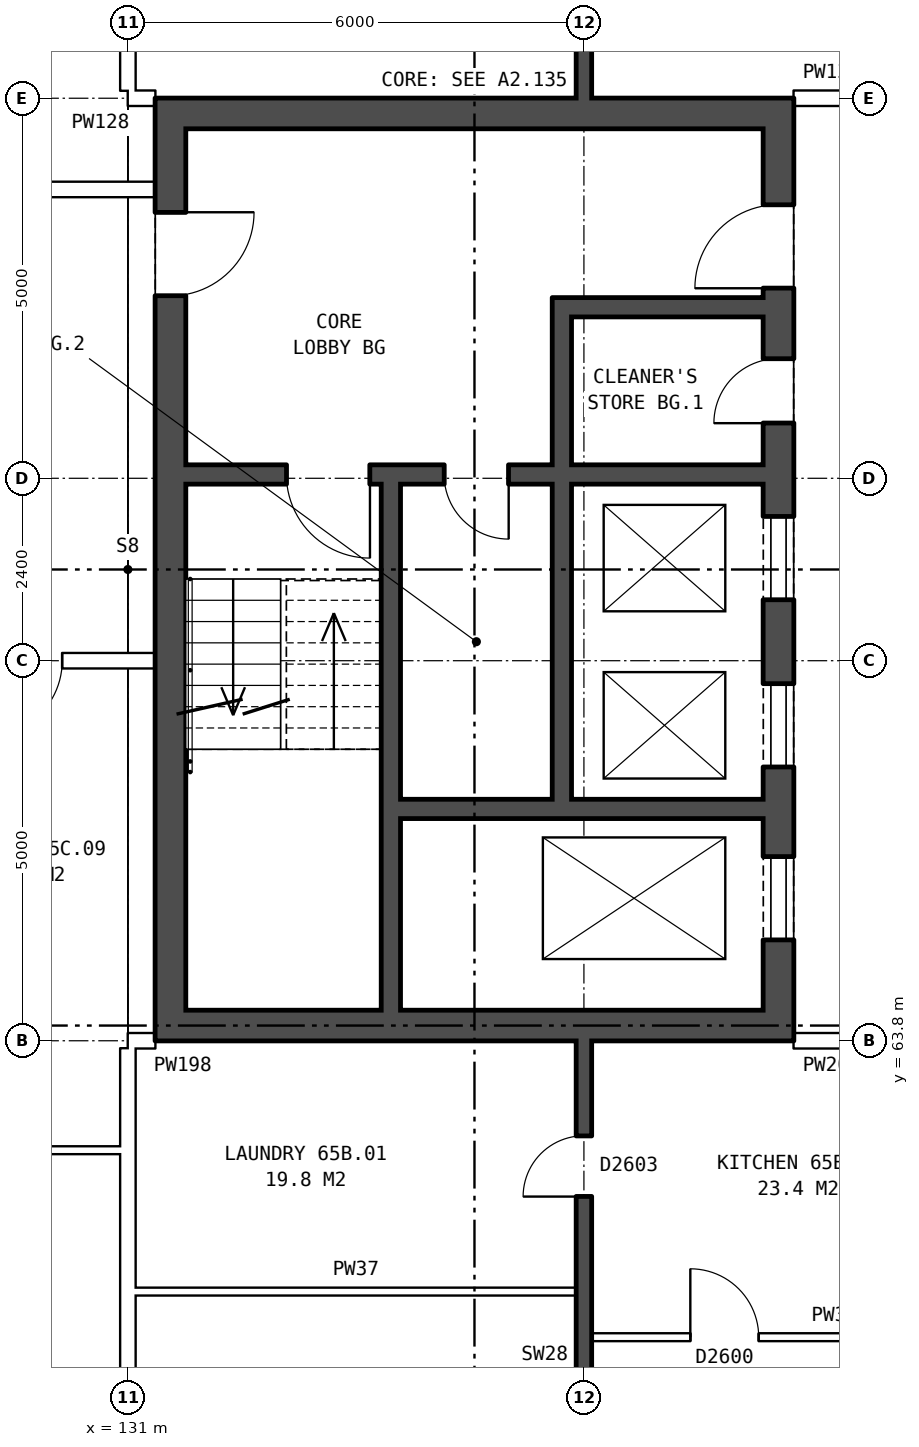
"""IFC4 building model, lengths in metres.
Left out: names, types, materials, properties, quantities, classifications, styles, units other than length and angle.
Written with IfcOpenShell. Run it as: python <this file> out.ifc"""

import sys

from ifc_helpers import new_model, si_unit, direction, frame, frame_2d, origin, place, context, subcontext, project, spatial, rectangle, extrude, element, fill, save


model = new_model("IFC4")
c1 = context("Model", 3, precision=1e-05, world=origin(), true_north=direction((0.0, 1.0)))
c2 = subcontext(c1, "Body", "Model", "MODEL_VIEW")
j1 = project(units=[si_unit("LENGTHUNIT", "METRE"), si_unit("PLANEANGLEUNIT", "RADIAN")], contexts=[c1])
p1 = place(None, origin())
s1 = spatial("IfcSite", under=j1, at=p1, CompositionType="ELEMENT")
p2 = place(p1, origin())
s2 = spatial("IfcBuilding", under=s1, at=p2, CompositionType="ELEMENT")
p3 = place(p2, frame((0.0, 0.0, 230.7)))
s3 = spatial("IfcBuildingStorey", under=s2, at=p3, CompositionType="ELEMENT", Elevation=230.7)
p4 = place(p3, frame((139.56, 63.8, 0.0), z_axis=(0.0, 0.0, 1.0), x_axis=(0.0, 1.0, 0.0)))
e1 = element("IfcWall", 1, at=p4, inside=s3, PredefinedType="SHEAR", context=c2, shape_type="SweptSolid", body=[
    extrude(rectangle(XDim=12.4, YDim=0.4, at=frame_2d((6.2, 0.0))), origin(), (0.0, 0.0, 1.0), 2.85),
])
p5 = place(p4, frame((1.325, 0.0, 0.0)))
e2 = element("IfcOpeningElement", 2, at=p5, cuts=e1, PredefinedType="OPENING", context=c2, shape_type="SweptSolid", body=[
    extrude(rectangle(XDim=1.1, YDim=2.1, at=frame_2d((0.55, 1.05))), frame((0.0, 0.21, 0.0), z_axis=(0.0, -1.0, 0.0), x_axis=(1.0, 0.0, 0.0)), (0.0, 0.0, 1.0), 0.42),
])
p6 = place(p4, frame((3.6, 0.0, 0.0)))
e3 = element("IfcOpeningElement", 3, at=p6, cuts=e1, PredefinedType="OPENING", context=c2, shape_type="SweptSolid", body=[
    extrude(rectangle(XDim=1.1, YDim=2.1, at=frame_2d((0.55, 1.05))), frame((0.0, 0.21, 0.0), z_axis=(0.0, -1.0, 0.0), x_axis=(1.0, 0.0, 0.0)), (0.0, 0.0, 1.0), 0.42),
])
p7 = place(p4, frame((5.8, 0.0, 0.0)))
e4 = element("IfcOpeningElement", 4, at=p7, cuts=e1, PredefinedType="OPENING", context=c2, shape_type="SweptSolid", body=[
    extrude(rectangle(XDim=1.1, YDim=2.1, at=frame_2d((0.55, 1.05))), frame((0.0, 0.21, 0.0), z_axis=(0.0, -1.0, 0.0), x_axis=(1.0, 0.0, 0.0)), (0.0, 0.0, 1.0), 0.42),
])
p8 = place(p4, frame((9.9, 0.0, 0.0)))
e5 = element("IfcOpeningElement", 5, at=p8, cuts=e1, PredefinedType="OPENING", context=c2, shape_type="SweptSolid", body=[
    extrude(rectangle(XDim=1.1, YDim=2.1, at=frame_2d((0.55, 1.05))), frame((0.0, 0.21, 0.0), z_axis=(0.0, -1.0, 0.0), x_axis=(1.0, 0.0, 0.0)), (0.0, 0.0, 1.0), 0.42),
])
p9 = place(p4, frame((8.125, 0.0, 0.0)))
e6 = element("IfcOpeningElement", 6, at=p9, cuts=e1, PredefinedType="OPENING", context=c2, shape_type="SweptSolid", body=[
    extrude(rectangle(XDim=0.85, YDim=2.1, at=frame_2d((0.425, 1.05))), frame((0.0, 0.21, 0.0), z_axis=(0.0, -1.0, 0.0), x_axis=(1.0, 0.0, 0.0)), (0.0, 0.0, 1.0), 0.42),
])
p10 = place(p3, frame((131.56, 63.8, 0.0), z_axis=(0.0, 0.0, 1.0), x_axis=(0.0, 1.0, 0.0)))
e7 = element("IfcWall", 7, at=p10, inside=s3, PredefinedType="SHEAR", context=c2, shape_type="SweptSolid", body=[
    extrude(rectangle(XDim=12.4, YDim=0.4, at=frame_2d((6.2, 0.0))), origin(), (0.0, 0.0, 1.0), 2.85),
])
p11 = place(p10, frame((9.8, 0.0, 0.0)))
e8 = element("IfcOpeningElement", 8, at=p11, cuts=e7, PredefinedType="OPENING", context=c2, shape_type="SweptSolid", body=[
    extrude(rectangle(XDim=1.1, YDim=2.1, at=frame_2d((0.55, 1.05))), frame((0.0, 0.21, 0.0), z_axis=(0.0, -1.0, 0.0), x_axis=(1.0, 0.0, 0.0)), (0.0, 0.0, 1.0), 0.42),
])
for number, where, z_axis, x_axis in (
    (9, (139.36, 64.0, 0.0), (0.0, 0.0, 1.0), (-1.0, 0.0, 0.0)),
    (10, (139.36, 76.0, 0.0), (0.0, 0.0, 1.0), (-1.0, 0.0, 0.0)),
):
    element("IfcWall", number, at=place(p3, frame(where, z_axis=z_axis, x_axis=x_axis)), inside=s3, PredefinedType="SHEAR", context=c2, shape_type="SweptSolid", body=[
        extrude(rectangle(XDim=7.6, YDim=0.4, at=frame_2d((3.8, 0.0))), origin(), (0.0, 0.0, 1.0), 2.85),
    ])
p12 = place(p3, frame((139.36, 66.85, 0.0), z_axis=(0.0, 0.0, 1.0), x_axis=(-1.0, 0.0, 0.0)))
e11 = element("IfcWall", 11, at=p12, inside=s3, PredefinedType="SHEAR", context=c2, shape_type="SweptSolid", body=[
    extrude(rectangle(XDim=4.775, YDim=0.25, at=frame_2d((2.388, 0.0))), origin(), (0.0, 0.0, 1.0), 2.85),
])
p13 = place(p3, frame((139.36, 71.25, 0.0), z_axis=(0.0, 0.0, 1.0), x_axis=(-1.0, 0.0, 0.0)))
e12 = element("IfcWall", 12, at=p13, inside=s3, PredefinedType="SHEAR", context=c2, shape_type="SweptSolid", body=[
    extrude(rectangle(XDim=7.6, YDim=0.25, at=frame_2d((3.8, 0.0))), origin(), (0.0, 0.0, 1.0), 2.85),
])
p14 = place(p13, frame((5.175, 0.0, 0.0)))
e13 = element("IfcOpeningElement", 13, at=p14, cuts=e12, PredefinedType="OPENING", context=c2, shape_type="SweptSolid", body=[
    extrude(rectangle(XDim=1.1, YDim=2.1, at=frame_2d((0.55, 1.05))), frame((0.0, 0.135, 0.0), z_axis=(0.0, -1.0, 0.0), x_axis=(1.0, 0.0, 0.0)), (0.0, 0.0, 1.0), 0.27),
])
p15 = place(p13, frame((3.35, 0.0, 0.0)))
e14 = element("IfcOpeningElement", 14, at=p15, cuts=e12, PredefinedType="OPENING", context=c2, shape_type="SweptSolid", body=[
    extrude(rectangle(XDim=0.85, YDim=2.1, at=frame_2d((0.425, 1.05))), frame((0.0, 0.135, 0.0), z_axis=(0.0, -1.0, 0.0), x_axis=(1.0, 0.0, 0.0)), (0.0, 0.0, 1.0), 0.27),
])
p16 = place(p3, frame((139.36, 73.45, 0.0), z_axis=(0.0, 0.0, 1.0), x_axis=(-1.0, 0.0, 0.0)))
e15 = element("IfcWall", 15, at=p16, inside=s3, PredefinedType="SHEAR", context=c2, shape_type="SweptSolid", body=[
    extrude(rectangle(XDim=2.525, YDim=0.25, at=frame_2d((1.263, 0.0))), origin(), (0.0, 0.0, 1.0), 2.85),
])
p17 = place(p3, frame((136.71, 66.975, 0.0), z_axis=(0.0, 0.0, 1.0), x_axis=(0.0, 1.0, 0.0)))
e16 = element("IfcWall", 16, at=p17, inside=s3, PredefinedType="SHEAR", context=c2, shape_type="SweptSolid", body=[
    extrude(rectangle(XDim=4.15, YDim=0.25, at=frame_2d((2.075, 0.0))), origin(), (0.0, 0.0, 1.0), 2.85),
])
p18 = place(p3, frame((136.71, 71.375, 0.0), z_axis=(0.0, 0.0, 1.0), x_axis=(0.0, 1.0, 0.0)))
e17 = element("IfcWall", 17, at=p18, inside=s3, PredefinedType="SHEAR", context=c2, shape_type="SweptSolid", body=[
    extrude(rectangle(XDim=2.2, YDim=0.25, at=frame_2d((1.1, 0.0))), origin(), (0.0, 0.0, 1.0), 2.85),
])
p19 = place(p3, frame((134.46, 64.2, 0.0), z_axis=(0.0, 0.0, 1.0), x_axis=(0.0, 1.0, 0.0)))
e18 = element("IfcWall", 18, at=p19, inside=s3, PredefinedType="SHEAR", context=c2, shape_type="SweptSolid", body=[
    extrude(rectangle(XDim=6.925, YDim=0.25, at=frame_2d((3.462, 0.0))), origin(), (0.0, 0.0, 1.0), 2.85),
])
p20 = place(p3, frame((137.1, 59.9, 0.0), z_axis=(0.0, 0.0, 1.0), x_axis=(1.0, 0.0, 0.0)))
e19 = element("IfcWall", 19, at=p20, inside=s3, PredefinedType="PARTITIONING", context=c2, shape_type="SweptSolid", body=[
    extrude(rectangle(XDim=5.8, YDim=0.1, at=frame_2d((2.9, 0.0))), origin(), (0.0, 0.0, 1.0), 2.85),
])
p21 = place(p20, frame((1.3, 0.0, 0.0)))
e20 = element("IfcOpeningElement", 20, at=p21, cuts=e19, PredefinedType="OPENING", context=c2, shape_type="SweptSolid", body=[
    extrude(rectangle(XDim=0.9, YDim=2.1, at=frame_2d((0.45, 1.05))), frame((0.0, 0.06, 0.0), z_axis=(0.0, -1.0, 0.0), x_axis=(1.0, 0.0, 0.0)), (0.0, 0.0, 1.0), 0.12),
])
p22 = place(p20, frame((4.2, 0.0, 0.0)))
e21 = element("IfcOpeningElement", 21, at=p22, cuts=e19, PredefinedType="OPENING", context=c2, shape_type="SweptSolid", body=[
    extrude(rectangle(XDim=0.9, YDim=2.1, at=frame_2d((0.45, 1.05))), frame((0.0, 0.06, 0.0), z_axis=(0.0, -1.0, 0.0), x_axis=(1.0, 0.0, 0.0)), (0.0, 0.0, 1.0), 0.12),
])
p23 = place(p3, frame((131.1, 60.5, 0.0), z_axis=(0.0, 0.0, 1.0), x_axis=(1.0, 0.0, 0.0)))
e22 = element("IfcWall", 22, at=p23, inside=s3, PredefinedType="PARTITIONING", context=c2, shape_type="SweptSolid", body=[
    extrude(rectangle(XDim=5.8, YDim=0.1, at=frame_2d((2.9, 0.0))), origin(), (0.0, 0.0, 1.0), 2.85),
])
p24 = place(p3, frame((127.912, 62.36, 0.0), z_axis=(0.0, 0.0, 1.0), x_axis=(1.0, 0.0, 0.0)))
e23 = element("IfcWall", 23, at=p24, inside=s3, PredefinedType="PARTITIONING", context=c2, shape_type="SweptSolid", body=[
    extrude(rectangle(XDim=2.988, YDim=0.1, at=frame_2d((1.494, 0.0))), origin(), (0.0, 0.0, 1.0), 2.85),
])
p25 = place(p24, frame((1.044, 0.0, 0.0)))
e24 = element("IfcOpeningElement", 24, at=p25, cuts=e23, PredefinedType="OPENING", context=c2, shape_type="SweptSolid", body=[
    extrude(rectangle(XDim=0.9, YDim=2.1, at=frame_2d((0.45, 1.05))), frame((0.0, 0.06, 0.0), z_axis=(0.0, -1.0, 0.0), x_axis=(1.0, 0.0, 0.0)), (0.0, 0.0, 1.0), 0.12),
])
p26 = place(p3, frame((131.0, 63.8, 0.0), z_axis=(0.0, 0.0, 1.0), x_axis=(1.0, 0.0, 0.0)))
e25 = element("IfcWall", 25, at=p26, inside=s3, PredefinedType="PARTITIONING", context=c2, shape_type="SweptSolid", body=[
    extrude(rectangle(XDim=0.36, YDim=0.2, at=frame_2d((0.18, 0.0))), origin(), (0.0, 0.0, 1.0), 2.85),
])
p27 = place(p3, frame((139.76, 63.8, 0.0), z_axis=(0.0, 0.0, 1.0), x_axis=(1.0, 0.0, 0.0)))
e26 = element("IfcWall", 26, at=p27, inside=s3, PredefinedType="PARTITIONING", context=c2, shape_type="SweptSolid", body=[
    extrude(rectangle(XDim=3.0, YDim=0.2, at=frame_2d((1.5, 0.0))), origin(), (0.0, 0.0, 1.0), 2.85),
])
p28 = place(p27, frame((1.0, 0.0, 0.0)))
e27 = element("IfcOpeningElement", 27, at=p28, cuts=e26, PredefinedType="OPENING", context=c2, shape_type="SweptSolid", body=[
    extrude(rectangle(XDim=1.0, YDim=2.1, at=frame_2d((0.5, 1.05))), frame((0.0, 0.11, 0.0), z_axis=(0.0, -1.0, 0.0), x_axis=(1.0, 0.0, 0.0)), (0.0, 0.0, 1.0), 0.22),
])
p29 = place(p3, frame((75.64, 68.8, 0.0), z_axis=(0.0, 0.0, 1.0), x_axis=(1.0, 0.0, 0.0)))
e28 = element("IfcWall", 28, at=p29, inside=s3, PredefinedType="PARTITIONING", context=c2, shape_type="SweptSolid", body=[
    extrude(rectangle(XDim=55.72, YDim=0.2, at=frame_2d((27.86, 0.0))), origin(), (0.0, 0.0, 1.0), 2.85),
])
p30 = place(p29, frame((5.191, 0.0, 0.0)))
e29 = element("IfcOpeningElement", 29, at=p30, cuts=e28, PredefinedType="OPENING", context=c2, shape_type="SweptSolid", body=[
    extrude(rectangle(XDim=1.0, YDim=2.1, at=frame_2d((0.5, 1.05))), frame((0.0, 0.11, 0.0), z_axis=(0.0, -1.0, 0.0), x_axis=(1.0, 0.0, 0.0)), (0.0, 0.0, 1.0), 0.22),
])
p31 = place(p29, frame((12.241, 0.0, 0.0)))
e30 = element("IfcOpeningElement", 30, at=p31, cuts=e28, PredefinedType="OPENING", context=c2, shape_type="SweptSolid", body=[
    extrude(rectangle(XDim=1.0, YDim=2.1, at=frame_2d((0.5, 1.05))), frame((0.0, 0.11, 0.0), z_axis=(0.0, -1.0, 0.0), x_axis=(1.0, 0.0, 0.0)), (0.0, 0.0, 1.0), 0.22),
])
p32 = place(p29, frame((22.553, 0.0, 0.0)))
e31 = element("IfcOpeningElement", 31, at=p32, cuts=e28, PredefinedType="OPENING", context=c2, shape_type="SweptSolid", body=[
    extrude(rectangle(XDim=1.0, YDim=2.1, at=frame_2d((0.5, 1.05))), frame((0.0, 0.11, 0.0), z_axis=(0.0, -1.0, 0.0), x_axis=(1.0, 0.0, 0.0)), (0.0, 0.0, 1.0), 0.22),
])
p33 = place(p29, frame((32.866, 0.0, 0.0)))
e32 = element("IfcOpeningElement", 32, at=p33, cuts=e28, PredefinedType="OPENING", context=c2, shape_type="SweptSolid", body=[
    extrude(rectangle(XDim=1.0, YDim=2.1, at=frame_2d((0.5, 1.05))), frame((0.0, 0.11, 0.0), z_axis=(0.0, -1.0, 0.0), x_axis=(1.0, 0.0, 0.0)), (0.0, 0.0, 1.0), 0.22),
])
p34 = place(p29, frame((36.303, 0.0, 0.0)))
e33 = element("IfcOpeningElement", 33, at=p34, cuts=e28, PredefinedType="OPENING", context=c2, shape_type="SweptSolid", body=[
    extrude(rectangle(XDim=1.0, YDim=2.1, at=frame_2d((0.5, 1.05))), frame((0.0, 0.11, 0.0), z_axis=(0.0, -1.0, 0.0), x_axis=(1.0, 0.0, 0.0)), (0.0, 0.0, 1.0), 0.22),
])
p35 = place(p29, frame((46.616, 0.0, 0.0)))
e34 = element("IfcOpeningElement", 34, at=p35, cuts=e28, PredefinedType="OPENING", context=c2, shape_type="SweptSolid", body=[
    extrude(rectangle(XDim=1.0, YDim=2.1, at=frame_2d((0.5, 1.05))), frame((0.0, 0.11, 0.0), z_axis=(0.0, -1.0, 0.0), x_axis=(1.0, 0.0, 0.0)), (0.0, 0.0, 1.0), 0.22),
])
p36 = place(p29, frame((53.496, 0.0, 0.0)))
e35 = element("IfcOpeningElement", 35, at=p36, cuts=e28, PredefinedType="OPENING", context=c2, shape_type="SweptSolid", body=[
    extrude(rectangle(XDim=1.0, YDim=2.1, at=frame_2d((0.5, 1.05))), frame((0.0, 0.11, 0.0), z_axis=(0.0, -1.0, 0.0), x_axis=(1.0, 0.0, 0.0)), (0.0, 0.0, 1.0), 0.22),
])
p37 = place(p3, frame((124.475, 75.0, 0.0), z_axis=(0.0, 0.0, 1.0), x_axis=(1.0, 0.0, 0.0)))
e36 = element("IfcWall", 36, at=p37, inside=s3, PredefinedType="PARTITIONING", context=c2, shape_type="SweptSolid", body=[
    extrude(rectangle(XDim=6.885, YDim=0.2, at=frame_2d((3.442, 0.0))), origin(), (0.0, 0.0, 1.0), 2.85),
])
p38 = place(p37, frame((2.992, 0.0, 0.0)))
e37 = element("IfcOpeningElement", 37, at=p38, cuts=e36, PredefinedType="OPENING", context=c2, shape_type="SweptSolid", body=[
    extrude(rectangle(XDim=0.9, YDim=2.1, at=frame_2d((0.45, 1.05))), frame((0.0, 0.11, 0.0), z_axis=(0.0, -1.0, 0.0), x_axis=(1.0, 0.0, 0.0)), (0.0, 0.0, 1.0), 0.22),
])
p39 = place(p3, frame((131.0, 76.2, 0.0), z_axis=(0.0, 0.0, 1.0), x_axis=(1.0, 0.0, 0.0)))
e38 = element("IfcWall", 38, at=p39, inside=s3, PredefinedType="PARTITIONING", context=c2, shape_type="SweptSolid", body=[
    extrude(rectangle(XDim=0.36, YDim=0.2, at=frame_2d((0.18, 0.0))), origin(), (0.0, 0.0, 1.0), 2.85),
])
p40 = place(p3, frame((139.76, 76.2, 0.0), z_axis=(0.0, 0.0, 1.0), x_axis=(1.0, 0.0, 0.0)))
e39 = element("IfcWall", 39, at=p40, inside=s3, PredefinedType="PARTITIONING", context=c2, shape_type="SweptSolid", body=[
    extrude(rectangle(XDim=3.0, YDim=0.2, at=frame_2d((1.5, 0.0))), origin(), (0.0, 0.0, 1.0), 2.85),
])
p41 = place(p40, frame((1.0, 0.0, 0.0)))
e40 = element("IfcOpeningElement", 40, at=p41, cuts=e39, PredefinedType="OPENING", context=c2, shape_type="SweptSolid", body=[
    extrude(rectangle(XDim=1.0, YDim=2.1, at=frame_2d((0.5, 1.05))), frame((0.0, 0.11, 0.0), z_axis=(0.0, -1.0, 0.0), x_axis=(1.0, 0.0, 0.0)), (0.0, 0.0, 1.0), 0.22),
])
for number, where, z_axis, x_axis in (
    (41, (131.0, 54.36, 0.0), (0.0, 0.0, 1.0), (0.0, 1.0, 0.0)),
    (42, (131.0, 76.3, 0.0), (0.0, 0.0, 1.0), (0.0, 1.0, 0.0)),
):
    element("IfcWall", number, at=place(p3, frame(where, z_axis=z_axis, x_axis=x_axis)), inside=s3, PredefinedType="PARTITIONING", context=c2, shape_type="SweptSolid", body=[
        extrude(rectangle(XDim=9.34, YDim=0.2, at=frame_2d((4.67, 0.0))), origin(), (0.0, 0.0, 1.0), 2.85),
    ])
p42 = place(p3, frame((137.0, 54.36, 0.0), z_axis=(0.0, 0.0, 1.0), x_axis=(0.0, 1.0, 0.0)))
e43 = element("IfcWall", 43, at=p42, inside=s3, PredefinedType="SOLIDWALL", context=c2, shape_type="SweptSolid", body=[
    extrude(rectangle(XDim=9.44, YDim=0.2, at=frame_2d((4.72, 0.0))), origin(), (0.0, 0.0, 1.0), 2.85),
])
p43 = place(p42, frame((2.32, 0.0, 0.0)))
e44 = element("IfcOpeningElement", 44, at=p43, cuts=e43, PredefinedType="OPENING", context=c2, shape_type="SweptSolid", body=[
    extrude(rectangle(XDim=0.9, YDim=2.1, at=frame_2d((0.45, 1.05))), frame((0.0, 0.11, 0.0), z_axis=(0.0, -1.0, 0.0), x_axis=(1.0, 0.0, 0.0)), (0.0, 0.0, 1.0), 0.22),
])
p44 = place(p42, frame((7.39, 0.0, 0.0)))
e45 = element("IfcOpeningElement", 45, at=p44, cuts=e43, PredefinedType="OPENING", context=c2, shape_type="SweptSolid", body=[
    extrude(rectangle(XDim=0.8, YDim=2.1, at=frame_2d((0.4, 1.05))), frame((0.0, 0.11, 0.0), z_axis=(0.0, -1.0, 0.0), x_axis=(1.0, 0.0, 0.0)), (0.0, 0.0, 1.0), 0.22),
])
p45 = place(p3, frame((137.0, 76.2, 0.0), z_axis=(0.0, 0.0, 1.0), x_axis=(0.0, 1.0, 0.0)))
e46 = element("IfcWall", 46, at=p45, inside=s3, PredefinedType="SOLIDWALL", context=c2, shape_type="SweptSolid", body=[
    extrude(rectangle(XDim=9.44, YDim=0.2, at=frame_2d((4.72, 0.0))), origin(), (0.0, 0.0, 1.0), 2.85),
])
p46 = place(p45, frame((6.22, 0.0, 0.0)))
e47 = element("IfcOpeningElement", 47, at=p46, cuts=e46, PredefinedType="OPENING", context=c2, shape_type="SweptSolid", body=[
    extrude(rectangle(XDim=0.9, YDim=2.1, at=frame_2d((0.45, 1.05))), frame((0.0, 0.11, 0.0), z_axis=(0.0, -1.0, 0.0), x_axis=(1.0, 0.0, 0.0)), (0.0, 0.0, 1.0), 0.22),
])
p47 = place(p45, frame((1.25, 0.0, 0.0)))
e48 = element("IfcOpeningElement", 48, at=p47, cuts=e46, PredefinedType="OPENING", context=c2, shape_type="SweptSolid", body=[
    extrude(rectangle(XDim=0.8, YDim=2.1, at=frame_2d((0.4, 1.05))), frame((0.0, 0.11, 0.0), z_axis=(0.0, -1.0, 0.0), x_axis=(1.0, 0.0, 0.0)), (0.0, 0.0, 1.0), 0.22),
])
p48 = place(p5, origin())
e49 = element("IfcDoor", 49, at=p48, inside=s3, OperationType="DOUBLE_DOOR_SLIDING", PredefinedType="DOOR", context=c2, shape_type="SweptSolid", body=[
    extrude(rectangle(XDim=1.1, YDim=2.1, at=frame_2d((0.55, 1.05))), frame((0.0, 0.185, 0.0), z_axis=(0.0, -1.0, 0.0), x_axis=(1.0, 0.0, 0.0)), (0.0, 0.0, 1.0), 0.05),
])
fill(e2, e49)
p49 = place(p6, origin())
e50 = element("IfcDoor", 50, at=p49, inside=s3, OperationType="DOUBLE_DOOR_SLIDING", PredefinedType="DOOR", context=c2, shape_type="SweptSolid", body=[
    extrude(rectangle(XDim=1.1, YDim=2.1, at=frame_2d((0.55, 1.05))), frame((0.0, 0.185, 0.0), z_axis=(0.0, -1.0, 0.0), x_axis=(1.0, 0.0, 0.0)), (0.0, 0.0, 1.0), 0.05),
])
fill(e3, e50)
p50 = place(p7, origin())
e51 = element("IfcDoor", 51, at=p50, inside=s3, OperationType="DOUBLE_DOOR_SLIDING", PredefinedType="DOOR", context=c2, shape_type="SweptSolid", body=[
    extrude(rectangle(XDim=1.1, YDim=2.1, at=frame_2d((0.55, 1.05))), frame((0.0, 0.185, 0.0), z_axis=(0.0, -1.0, 0.0), x_axis=(1.0, 0.0, 0.0)), (0.0, 0.0, 1.0), 0.05),
])
fill(e4, e51)
p51 = place(p8, origin())
e52 = element("IfcDoor", 52, at=p51, inside=s3, OperationType="SINGLE_SWING_LEFT", PredefinedType="DOOR", context=c2, shape_type="SweptSolid", body=[
    extrude(rectangle(XDim=1.1, YDim=2.1, at=frame_2d((0.55, 1.05))), frame((0.0, 0.185, 0.0), z_axis=(0.0, -1.0, 0.0), x_axis=(1.0, 0.0, 0.0)), (0.0, 0.0, 1.0), 0.05),
])
fill(e5, e52)
p52 = place(p14, origin())
e53 = element("IfcDoor", 53, at=p52, inside=s3, OperationType="SINGLE_SWING_LEFT", PredefinedType="DOOR", context=c2, shape_type="SweptSolid", body=[
    extrude(rectangle(XDim=1.1, YDim=2.1, at=frame_2d((0.55, 1.05))), frame((0.0, 0.025, 0.0), z_axis=(0.0, -1.0, 0.0), x_axis=(1.0, 0.0, 0.0)), (0.0, 0.0, 1.0), 0.05),
])
fill(e13, e53)
p53 = place(p9, origin())
e54 = element("IfcDoor", 54, at=p53, inside=s3, OperationType="SINGLE_SWING_LEFT", PredefinedType="DOOR", context=c2, shape_type="SweptSolid", body=[
    extrude(rectangle(XDim=0.85, YDim=2.1, at=frame_2d((0.425, 1.05))), frame((0.0, 0.185, 0.0), z_axis=(0.0, -1.0, 0.0), x_axis=(1.0, 0.0, 0.0)), (0.0, 0.0, 1.0), 0.05),
])
fill(e6, e54)
p54 = place(p15, origin())
e55 = element("IfcDoor", 55, at=p54, inside=s3, OperationType="SINGLE_SWING_LEFT", PredefinedType="DOOR", context=c2, shape_type="SweptSolid", body=[
    extrude(rectangle(XDim=0.85, YDim=2.1, at=frame_2d((0.425, 1.05))), frame((0.0, 0.025, 0.0), z_axis=(0.0, -1.0, 0.0), x_axis=(1.0, 0.0, 0.0)), (0.0, 0.0, 1.0), 0.05),
])
fill(e14, e55)
p55 = place(p11, frame((1.1, 0.0, 0.0), z_axis=(0.0, 0.0, 1.0), x_axis=(-1.0, 0.0, 0.0)))
e56 = element("IfcDoor", 56, at=p55, inside=s3, OperationType="SINGLE_SWING_LEFT", PredefinedType="DOOR", context=c2, shape_type="SweptSolid", body=[
    extrude(rectangle(XDim=1.1, YDim=2.1, at=frame_2d((0.55, 1.05))), frame((0.0, 0.185, 0.0), z_axis=(0.0, -1.0, 0.0), x_axis=(1.0, 0.0, 0.0)), (0.0, 0.0, 1.0), 0.05),
])
fill(e8, e56)
p56 = place(p21, origin())
e57 = element("IfcDoor", 57, at=p56, inside=s3, OperationType="SINGLE_SWING_LEFT", PredefinedType="DOOR", context=c2, shape_type="SweptSolid", body=[
    extrude(rectangle(XDim=0.9, YDim=2.1, at=frame_2d((0.45, 1.05))), frame((0.0, 0.025, 0.0), z_axis=(0.0, -1.0, 0.0), x_axis=(1.0, 0.0, 0.0)), (0.0, 0.0, 1.0), 0.05),
])
fill(e20, e57)
p57 = place(p44, origin())
e58 = element("IfcDoor", 58, at=p57, inside=s3, OperationType="SINGLE_SWING_LEFT", PredefinedType="DOOR", context=c2, shape_type="SweptSolid", body=[
    extrude(rectangle(XDim=0.8, YDim=2.1, at=frame_2d((0.4, 1.05))), frame((0.0, 0.025, 0.0), z_axis=(0.0, -1.0, 0.0), x_axis=(1.0, 0.0, 0.0)), (0.0, 0.0, 1.0), 0.05),
])
fill(e45, e58)
p58 = place(p36, frame((1.0, 0.0, 0.0), z_axis=(0.0, 0.0, 1.0), x_axis=(-1.0, 0.0, 0.0)))
e59 = element("IfcDoor", 59, at=p58, inside=s3, OperationType="SINGLE_SWING_RIGHT", PredefinedType="DOOR", context=c2, shape_type="SweptSolid", body=[
    extrude(rectangle(XDim=1.0, YDim=2.1, at=frame_2d((0.5, 1.05))), frame((0.0, 0.025, 0.0), z_axis=(0.0, -1.0, 0.0), x_axis=(1.0, 0.0, 0.0)), (0.0, 0.0, 1.0), 0.05),
])
fill(e35, e59)
save(model, sys.argv[1])
